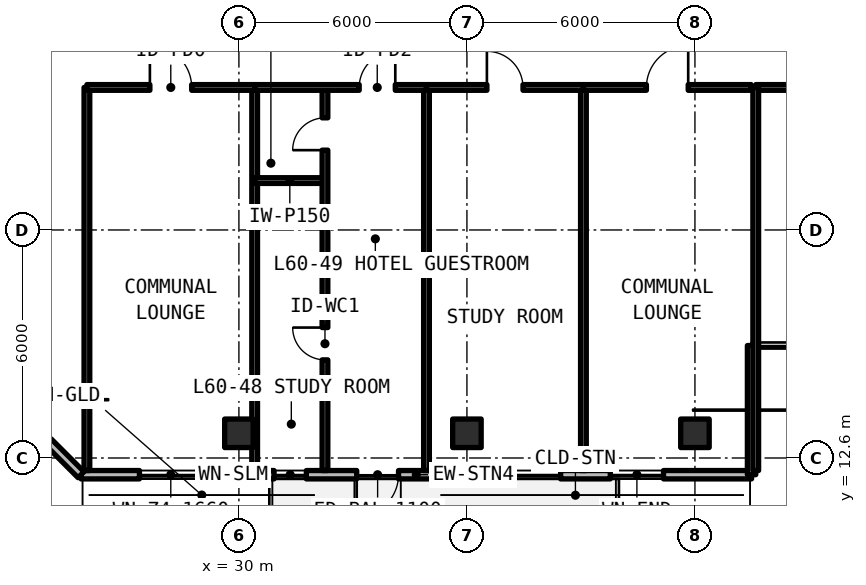
"""IFC4 building model, lengths in metres.
Left out: names, types, materials, properties, quantities, classifications, styles, units other than length and angle.
Written with IfcOpenShell. Run it as: python <this file> out.ifc"""

import sys

from ifc_helpers import new_model, si_unit, direction, frame, frame_2d, origin, origin_2d, place, context, subcontext, project, spatial, rectangle, extrude, element, fill, save


model = new_model("IFC4")
c1 = context("Model", 3, precision=1e-05, world=origin(), true_north=direction((0.0, 1.0)))
c2 = subcontext(c1, "Body", "Model", "MODEL_VIEW")
j1 = project(units=[si_unit("LENGTHUNIT", "METRE"), si_unit("PLANEANGLEUNIT", "RADIAN")], contexts=[c1])
p1 = place(None, origin())
s1 = spatial("IfcSite", under=j1, at=p1, CompositionType="ELEMENT")
p2 = place(p1, origin())
s2 = spatial("IfcBuilding", under=s1, at=p2, CompositionType="ELEMENT")
p3 = place(p2, frame((0.0, 0.0, 215.49)))
s3 = spatial("IfcBuildingStorey", under=s2, at=p3, CompositionType="ELEMENT", Elevation=215.49)
for number, where, z_axis, x_axis in (
    (1, (30.0, 13.25, 0.0), (0.0, 0.0, 1.0), (1.0, 0.0, 0.0)),
    (2, (36.0, 13.25, 0.0), (0.0, 0.0, 1.0), (1.0, 0.0, 0.0)),
    (3, (42.0, 13.25, 0.0), (0.0, 0.0, 1.0), (1.0, 0.0, 0.0)),
):
    element("IfcColumn", number, at=place(p3, frame(where, z_axis=z_axis, x_axis=x_axis)), inside=s3, PredefinedType="COLUMN", context=c2, shape_type="SweptSolid", body=[
        extrude(rectangle(XDim=0.75, YDim=0.75, at=origin_2d()), origin(), (0.0, 0.0, 1.0), 3.63),
    ])
p4 = place(p3, frame((25.846, 12.16, 0.0), z_axis=(0.0, 0.0, 1.0), x_axis=(1.0, 0.0, 0.0)))
e4 = element("IfcWall", 4, at=p4, inside=s3, PredefinedType="SOLIDWALL", context=c2, shape_type="SweptSolid", body=[
    extrude(rectangle(XDim=17.644, YDim=0.22, at=frame_2d((8.822, 0.0))), origin(), (0.0, 0.0, 1.0), 3.41),
])
p5 = place(p4, frame((7.254, 0.0, 0.0)))
e5 = element("IfcOpeningElement", 5, at=p5, cuts=e4, PredefinedType="OPENING", context=c2, shape_type="SweptSolid", body=[
    extrude(rectangle(XDim=1.1, YDim=2.15, at=frame_2d((0.55, 1.075))), frame((0.0, 0.12, 0.0), z_axis=(0.0, -1.0, 0.0), x_axis=(1.0, 0.0, 0.0)), (0.0, 0.0, 1.0), 0.24),
])
p6 = place(p4, frame((1.537, 0.0, 0.78)))
e6 = element("IfcOpeningElement", 6, at=p6, cuts=e4, PredefinedType="OPENING", context=c2, shape_type="SweptSolid", body=[
    extrude(rectangle(XDim=1.65, YDim=1.66, at=frame_2d((0.825, 0.83))), frame((0.0, 0.12, 0.0), z_axis=(0.0, -1.0, 0.0), x_axis=(1.0, 0.0, 0.0)), (0.0, 0.0, 1.0), 0.24),
])
p7 = place(p4, frame((5.079, 0.0, 0.78)))
e7 = element("IfcOpeningElement", 7, at=p7, cuts=e4, PredefinedType="OPENING", context=c2, shape_type="SweptSolid", body=[
    extrude(rectangle(XDim=0.85, YDim=1.65, at=frame_2d((0.425, 0.825))), frame((0.0, 0.12, 0.0), z_axis=(0.0, -1.0, 0.0), x_axis=(1.0, 0.0, 0.0)), (0.0, 0.0, 1.0), 0.24),
])
p8 = place(p4, frame((10.97, 0.0, 0.78)))
e8 = element("IfcOpeningElement", 8, at=p8, cuts=e4, PredefinedType="OPENING", context=c2, shape_type="SweptSolid", body=[
    extrude(rectangle(XDim=1.65, YDim=1.66, at=frame_2d((0.825, 0.83))), frame((0.0, 0.12, 0.0), z_axis=(0.0, -1.0, 0.0), x_axis=(1.0, 0.0, 0.0)), (0.0, 0.0, 1.0), 0.24),
])
p9 = place(p4, frame((13.927, 0.0, 0.78)))
e9 = element("IfcOpeningElement", 9, at=p9, cuts=e4, PredefinedType="OPENING", context=c2, shape_type="SweptSolid", body=[
    extrude(rectangle(XDim=1.4, YDim=1.65, at=frame_2d((0.7, 0.825))), frame((0.0, 0.12, 0.0), z_axis=(0.0, -1.0, 0.0), x_axis=(1.0, 0.0, 0.0)), (0.0, 0.0, 1.0), 0.24),
])
p10 = place(p3, frame((43.49, 12.16, 0.0), z_axis=(0.0, 0.0, 1.0), x_axis=(0.0, 1.0, 0.0)))
e10 = element("IfcWall", 10, at=p10, inside=s3, PredefinedType="SOLIDWALL", context=c2, shape_type="SweptSolid", body=[
    extrude(rectangle(XDim=3.4, YDim=0.22, at=frame_2d((1.7, 0.0))), origin(), (0.0, 0.0, 1.0), 3.41),
])
p11 = place(p3, frame((21.71, 16.296, 0.0), z_axis=(0.0, 0.0, 1.0), x_axis=(0.707106781187, -0.707106781187, 0.0)))
e11 = element("IfcWall", 11, at=p11, inside=s3, PredefinedType="SOLIDWALL", context=c2, shape_type="SweptSolid", body=[
    extrude(rectangle(XDim=5.849, YDim=0.22, at=frame_2d((2.924, 0.0))), origin(), (0.0, 0.0, 1.0), 3.41),
])
p12 = place(p11, frame((1.224, 0.0, 0.78)))
e12 = element("IfcOpeningElement", 12, at=p12, cuts=e11, PredefinedType="OPENING", context=c2, shape_type="SweptSolid", body=[
    extrude(rectangle(XDim=3.4, YDim=1.66, at=frame_2d((1.7, 0.83))), frame((0.0, 0.12, 0.0), z_axis=(0.0, -1.0, 0.0), x_axis=(1.0, 0.0, 0.0)), (0.0, 0.0, 1.0), 0.24),
])
p13 = place(p3, frame((43.6, 22.35, 0.0), z_axis=(0.0, 0.0, 1.0), x_axis=(1.0, 0.0, 0.0)))
e13 = element("IfcWall", 13, at=p13, inside=s3, PredefinedType="SOLIDWALL", context=c2, shape_type="SweptSolid", body=[
    extrude(rectangle(XDim=8.4, YDim=0.15, at=frame_2d((4.2, 0.0))), origin(), (0.0, 0.0, 1.0), 2.63),
])
p14 = place(p13, frame((3.65, 0.0, 0.0)))
e14 = element("IfcOpeningElement", 14, at=p14, cuts=e13, PredefinedType="OPENING", context=c2, shape_type="SweptSolid", body=[
    extrude(rectangle(XDim=1.1, YDim=2.15, at=frame_2d((0.55, 1.075))), frame((0.0, 0.085, 0.0), z_axis=(0.0, -1.0, 0.0), x_axis=(1.0, 0.0, 0.0)), (0.0, 0.0, 1.0), 0.17),
])
for number, where, z_axis, x_axis in (
    (15, (43.6, 12.27, 0.0), (0.0, 0.0, 1.0), (0.0, 1.0, 0.0)),
    (16, (26.0, 12.27, 0.0), (0.0, 0.0, 1.0), (0.0, 1.0, 0.0)),
    (17, (30.415, 12.27, 0.0), (0.0, 0.0, 1.0), (0.0, 1.0, 0.0)),
):
    element("IfcWall", number, at=place(p3, frame(where, z_axis=z_axis, x_axis=x_axis)), inside=s3, PredefinedType="SOLIDWALL", context=c2, shape_type="SweptSolid", body=[
        extrude(rectangle(XDim=10.08, YDim=0.15, at=frame_2d((5.04, 0.0))), origin(), (0.0, 0.0, 1.0), 2.63),
    ])
p15 = place(p3, frame((26.0, 22.35, 0.0), z_axis=(0.0, 0.0, 1.0), x_axis=(1.0, 0.0, 0.0)))
e18 = element("IfcWall", 18, at=p15, inside=s3, PredefinedType="SOLIDWALL", context=c2, shape_type="SweptSolid", body=[
    extrude(rectangle(XDim=4.415, YDim=0.15, at=frame_2d((2.207, 0.0))), origin(), (0.0, 0.0, 1.0), 2.63),
])
p16 = place(p15, frame((1.657, 0.0, 0.0)))
e19 = element("IfcOpeningElement", 19, at=p16, cuts=e18, PredefinedType="OPENING", context=c2, shape_type="SweptSolid", body=[
    extrude(rectangle(XDim=1.1, YDim=2.15, at=frame_2d((0.55, 1.075))), frame((0.0, 0.085, 0.0), z_axis=(0.0, -1.0, 0.0), x_axis=(1.0, 0.0, 0.0)), (0.0, 0.0, 1.0), 0.17),
])
p17 = place(p3, frame((34.936, 12.27, 0.0), z_axis=(0.0, 0.0, 1.0), x_axis=(0.0, 1.0, 0.0)))
e20 = element("IfcWall", 20, at=p17, inside=s3, PredefinedType="SOLIDWALL", context=c2, shape_type="SweptSolid", body=[
    extrude(rectangle(XDim=10.08, YDim=0.15, at=frame_2d((5.04, 0.0))), origin(), (0.0, 0.0, 1.0), 2.63),
])
p18 = place(p3, frame((30.415, 19.9, 0.0), z_axis=(0.0, 0.0, 1.0), x_axis=(1.0, 0.0, 0.0)))
e21 = element("IfcWall", 21, at=p18, inside=s3, PredefinedType="PARTITIONING", context=c2, shape_type="SweptSolid", body=[
    extrude(rectangle(XDim=1.85, YDim=0.15, at=frame_2d((0.925, 0.0))), origin(), (0.0, 0.0, 1.0), 2.63),
])
p19 = place(p3, frame((32.264, 12.27, 0.0), z_axis=(0.0, 0.0, 1.0), x_axis=(0.0, 1.0, 0.0)))
e22 = element("IfcWall", 22, at=p19, inside=s3, PredefinedType="PARTITIONING", context=c2, shape_type="SweptSolid", body=[
    extrude(rectangle(XDim=10.08, YDim=0.15, at=frame_2d((5.04, 0.0))), origin(), (0.0, 0.0, 1.0), 2.63),
])
p20 = place(p19, frame((2.912, 0.0, 0.0)))
e23 = element("IfcOpeningElement", 23, at=p20, cuts=e22, PredefinedType="OPENING", context=c2, shape_type="SweptSolid", body=[
    extrude(rectangle(XDim=0.85, YDim=2.1, at=frame_2d((0.425, 1.05))), frame((0.0, 0.085, 0.0), z_axis=(0.0, -1.0, 0.0), x_axis=(1.0, 0.0, 0.0)), (0.0, 0.0, 1.0), 0.17),
])
p21 = place(p19, frame((8.43, 0.0, 0.0)))
e24 = element("IfcOpeningElement", 24, at=p21, cuts=e22, PredefinedType="OPENING", context=c2, shape_type="SweptSolid", body=[
    extrude(rectangle(XDim=0.85, YDim=2.1, at=frame_2d((0.425, 1.05))), frame((0.0, 0.085, 0.0), z_axis=(0.0, -1.0, 0.0), x_axis=(1.0, 0.0, 0.0)), (0.0, 0.0, 1.0), 0.17),
])
p22 = place(p3, frame((30.415, 22.35, 0.0), z_axis=(0.0, 0.0, 1.0), x_axis=(1.0, 0.0, 0.0)))
e25 = element("IfcWall", 25, at=p22, inside=s3, PredefinedType="SOLIDWALL", context=c2, shape_type="SweptSolid", body=[
    extrude(rectangle(XDim=4.521, YDim=0.15, at=frame_2d((2.261, 0.0))), origin(), (0.0, 0.0, 1.0), 2.63),
])
p23 = place(p22, frame((2.75, 0.0, 0.0)))
e26 = element("IfcOpeningElement", 26, at=p23, cuts=e25, PredefinedType="OPENING", context=c2, shape_type="SweptSolid", body=[
    extrude(rectangle(XDim=0.95, YDim=2.15, at=frame_2d((0.475, 1.075))), frame((0.0, 0.085, 0.0), z_axis=(0.0, -1.0, 0.0), x_axis=(1.0, 0.0, 0.0)), (0.0, 0.0, 1.0), 0.17),
])
p24 = place(p3, frame((39.065, 12.27, 0.0), z_axis=(0.0, 0.0, 1.0), x_axis=(0.0, 1.0, 0.0)))
e27 = element("IfcWall", 27, at=p24, inside=s3, PredefinedType="SOLIDWALL", context=c2, shape_type="SweptSolid", body=[
    extrude(rectangle(XDim=10.08, YDim=0.15, at=frame_2d((5.04, 0.0))), origin(), (0.0, 0.0, 1.0), 2.63),
])
p25 = place(p3, frame((34.936, 22.35, 0.0), z_axis=(0.0, 0.0, 1.0), x_axis=(1.0, 0.0, 0.0)))
e28 = element("IfcWall", 28, at=p25, inside=s3, PredefinedType="SOLIDWALL", context=c2, shape_type="SweptSolid", body=[
    extrude(rectangle(XDim=4.13, YDim=0.15, at=frame_2d((2.065, 0.0))), origin(), (0.0, 0.0, 1.0), 2.63),
])
p26 = place(p25, frame((1.59, 0.0, 0.0)))
e29 = element("IfcOpeningElement", 29, at=p26, cuts=e28, PredefinedType="OPENING", context=c2, shape_type="SweptSolid", body=[
    extrude(rectangle(XDim=0.95, YDim=2.15, at=frame_2d((0.475, 1.075))), frame((0.0, 0.085, 0.0), z_axis=(0.0, -1.0, 0.0), x_axis=(1.0, 0.0, 0.0)), (0.0, 0.0, 1.0), 0.17),
])
p27 = place(p3, frame((39.065, 22.35, 0.0), z_axis=(0.0, 0.0, 1.0), x_axis=(1.0, 0.0, 0.0)))
e30 = element("IfcWall", 30, at=p27, inside=s3, PredefinedType="SOLIDWALL", context=c2, shape_type="SweptSolid", body=[
    extrude(rectangle(XDim=4.415, YDim=0.15, at=frame_2d((2.207, 0.0))), origin(), (0.0, 0.0, 1.0), 2.63),
])
p28 = place(p27, frame((1.657, 0.0, 0.0)))
e31 = element("IfcOpeningElement", 31, at=p28, cuts=e30, PredefinedType="OPENING", context=c2, shape_type="SweptSolid", body=[
    extrude(rectangle(XDim=1.1, YDim=2.15, at=frame_2d((0.55, 1.075))), frame((0.0, 0.085, 0.0), z_axis=(0.0, -1.0, 0.0), x_axis=(1.0, 0.0, 0.0)), (0.0, 0.0, 1.0), 0.17),
])
p29 = place(p5, frame((1.1, 0.0, 0.0), z_axis=(0.0, 0.0, 1.0), x_axis=(-1.0, 0.0, 0.0)))
e32 = element("IfcDoor", 32, at=p29, inside=s3, OperationType="SINGLE_SWING_LEFT", PredefinedType="DOOR", context=c2, shape_type="SweptSolid", body=[
    extrude(rectangle(XDim=1.1, YDim=2.15, at=frame_2d((0.55, 1.075))), frame((0.0, 0.025, 0.0), z_axis=(0.0, -1.0, 0.0), x_axis=(1.0, 0.0, 0.0)), (0.0, 0.0, 1.0), 0.05),
])
fill(e5, e32)
p30 = place(p6, origin())
e33 = element("IfcWindow", 33, at=p30, inside=s3, PartitioningType="SINGLE_PANEL", PredefinedType="WINDOW", context=c2, shape_type="SweptSolid", body=[
    extrude(rectangle(XDim=1.65, YDim=1.66, at=frame_2d((0.825, 0.83))), frame((0.0, 0.03, 0.0), z_axis=(0.0, -1.0, 0.0), x_axis=(1.0, 0.0, 0.0)), (0.0, 0.0, 1.0), 0.06),
])
fill(e6, e33)
p31 = place(p7, origin())
e34 = element("IfcWindow", 34, at=p31, inside=s3, PartitioningType="SINGLE_PANEL", PredefinedType="WINDOW", context=c2, shape_type="SweptSolid", body=[
    extrude(rectangle(XDim=0.85, YDim=1.65, at=frame_2d((0.425, 0.825))), frame((0.0, 0.03, 0.0), z_axis=(0.0, -1.0, 0.0), x_axis=(1.0, 0.0, 0.0)), (0.0, 0.0, 1.0), 0.06),
])
fill(e7, e34)
p32 = place(p8, origin())
e35 = element("IfcWindow", 35, at=p32, inside=s3, PartitioningType="SINGLE_PANEL", PredefinedType="WINDOW", context=c2, shape_type="SweptSolid", body=[
    extrude(rectangle(XDim=1.65, YDim=1.66, at=frame_2d((0.825, 0.83))), frame((0.0, 0.03, 0.0), z_axis=(0.0, -1.0, 0.0), x_axis=(1.0, 0.0, 0.0)), (0.0, 0.0, 1.0), 0.06),
])
fill(e8, e35)
p33 = place(p9, origin())
e36 = element("IfcWindow", 36, at=p33, inside=s3, PartitioningType="SINGLE_PANEL", PredefinedType="WINDOW", context=c2, shape_type="SweptSolid", body=[
    extrude(rectangle(XDim=1.4, YDim=1.65, at=frame_2d((0.7, 0.825))), frame((0.0, 0.03, 0.0), z_axis=(0.0, -1.0, 0.0), x_axis=(1.0, 0.0, 0.0)), (0.0, 0.0, 1.0), 0.06),
])
fill(e9, e36)
p34 = place(p16, origin())
e37 = element("IfcDoor", 37, at=p34, inside=s3, OperationType="SINGLE_SWING_LEFT", PredefinedType="DOOR", context=c2, shape_type="SweptSolid", body=[
    extrude(rectangle(XDim=1.1, YDim=2.15, at=frame_2d((0.55, 1.075))), frame((0.0, 0.025, 0.0), z_axis=(0.0, -1.0, 0.0), x_axis=(1.0, 0.0, 0.0)), (0.0, 0.0, 1.0), 0.05),
])
fill(e19, e37)
p35 = place(p20, origin())
e38 = element("IfcDoor", 38, at=p35, inside=s3, OperationType="SINGLE_SWING_RIGHT", PredefinedType="DOOR", context=c2, shape_type="SweptSolid", body=[
    extrude(rectangle(XDim=0.85, YDim=2.1, at=frame_2d((0.425, 1.05))), frame((0.0, 0.025, 0.0), z_axis=(0.0, -1.0, 0.0), x_axis=(1.0, 0.0, 0.0)), (0.0, 0.0, 1.0), 0.05),
])
fill(e23, e38)
p36 = place(p21, origin())
e39 = element("IfcDoor", 39, at=p36, inside=s3, OperationType="SINGLE_SWING_LEFT", PredefinedType="DOOR", context=c2, shape_type="SweptSolid", body=[
    extrude(rectangle(XDim=0.85, YDim=2.1, at=frame_2d((0.425, 1.05))), frame((0.0, 0.025, 0.0), z_axis=(0.0, -1.0, 0.0), x_axis=(1.0, 0.0, 0.0)), (0.0, 0.0, 1.0), 0.05),
])
fill(e24, e39)
p37 = place(p23, origin())
e40 = element("IfcDoor", 40, at=p37, inside=s3, OperationType="SINGLE_SWING_RIGHT", PredefinedType="DOOR", context=c2, shape_type="SweptSolid", body=[
    extrude(rectangle(XDim=0.95, YDim=2.15, at=frame_2d((0.475, 1.075))), frame((0.0, 0.025, 0.0), z_axis=(0.0, -1.0, 0.0), x_axis=(1.0, 0.0, 0.0)), (0.0, 0.0, 1.0), 0.05),
])
fill(e26, e40)
p38 = place(p26, origin())
e41 = element("IfcDoor", 41, at=p38, inside=s3, OperationType="SINGLE_SWING_LEFT", PredefinedType="DOOR", context=c2, shape_type="SweptSolid", body=[
    extrude(rectangle(XDim=0.95, YDim=2.15, at=frame_2d((0.475, 1.075))), frame((0.0, 0.025, 0.0), z_axis=(0.0, -1.0, 0.0), x_axis=(1.0, 0.0, 0.0)), (0.0, 0.0, 1.0), 0.05),
])
fill(e29, e41)
p39 = place(p28, origin())
e42 = element("IfcDoor", 42, at=p39, inside=s3, OperationType="SINGLE_SWING_RIGHT", PredefinedType="DOOR", context=c2, shape_type="SweptSolid", body=[
    extrude(rectangle(XDim=1.1, YDim=2.15, at=frame_2d((0.55, 1.075))), frame((0.0, 0.025, 0.0), z_axis=(0.0, -1.0, 0.0), x_axis=(1.0, 0.0, 0.0)), (0.0, 0.0, 1.0), 0.05),
])
fill(e31, e42)
save(model, sys.argv[1])
